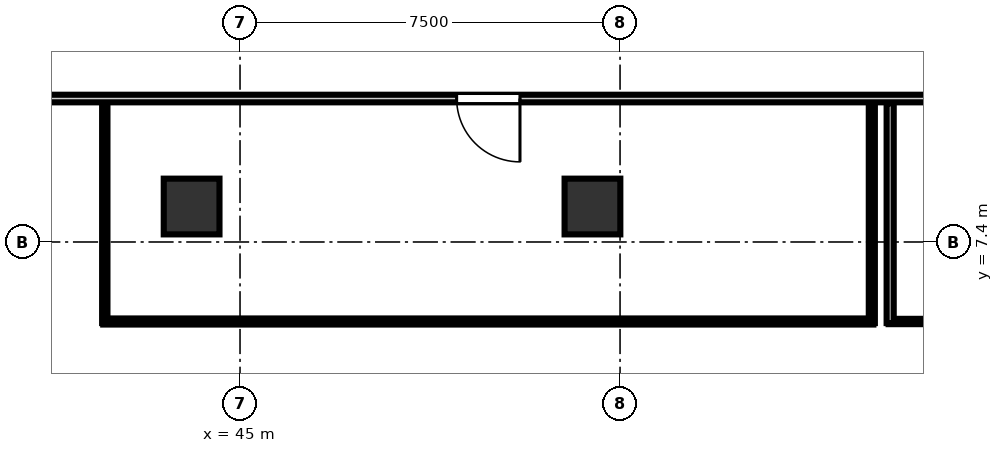
"""IFC4 building model, lengths in metres.
Left out: names, types, materials, properties, quantities, classifications, styles, units other than length and angle.
Written with IfcOpenShell. Run it as: python <this file> out.ifc"""

import sys

from ifc_helpers import new_model, si_unit, direction, frame, frame_2d, origin, origin_2d, place, context, subcontext, project, spatial, rectangle, extrude, element, fill, save


model = new_model("IFC4")
c1 = context("Model", 3, precision=1e-05, world=origin(), true_north=direction((0.0, 1.0)))
c2 = subcontext(c1, "Body", "Model", "MODEL_VIEW")
j1 = project(units=[si_unit("LENGTHUNIT", "METRE"), si_unit("PLANEANGLEUNIT", "RADIAN")], contexts=[c1])
p1 = place(None, origin())
s1 = spatial("IfcSite", under=j1, at=p1, CompositionType="ELEMENT")
p2 = place(p1, origin())
s2 = spatial("IfcBuilding", under=s1, at=p2, CompositionType="ELEMENT")
p3 = place(p2, frame((0.0, 0.0, 6.0)))
s3 = spatial("IfcBuildingStorey", under=s2, at=p3, CompositionType="ELEMENT", Elevation=6.0)
for number, where, z_axis, x_axis in (
    (1, (44.045, 8.1, 0.0), (0.0, 0.0, 1.0), (1.0, 0.0, 0.0)),
    (2, (51.955, 8.1, 0.0), (0.0, 0.0, 1.0), (1.0, 0.0, 0.0)),
):
    element("IfcColumn", number, at=place(p3, frame(where, z_axis=z_axis, x_axis=x_axis)), inside=s3, PredefinedType="COLUMN", context=c2, shape_type="SweptSolid", body=[
        extrude(rectangle(XDim=1.1, YDim=1.1, at=origin_2d()), origin(), (0.0, 0.0, 1.0), 5.0),
    ])
p4 = place(p3, frame((67.2, 10.231, 0.0), z_axis=(0.0, 0.0, 1.0), x_axis=(-1.0, 0.0, 0.0)))
e3 = element("IfcWall", 3, at=p4, inside=s3, PredefinedType="PARTITIONING", context=c2, shape_type="SweptSolid", body=[
    extrude(rectangle(XDim=60.4, YDim=0.15, at=frame_2d((30.2, 0.0))), origin(), (0.0, 0.0, 1.0), 4.1),
])
p5 = place(p4, frame((47.503, 0.0, 0.0)))
e4 = element("IfcOpeningElement", 4, at=p5, cuts=e3, PredefinedType="OPENING", context=c2, shape_type="SweptSolid", body=[
    extrude(rectangle(XDim=1.25, YDim=2.2, at=frame_2d((0.625, 1.1))), frame((0.0, 0.085, 0.0), z_axis=(0.0, -1.0, 0.0), x_axis=(1.0, 0.0, 0.0)), (0.0, 0.0, 1.0), 0.17),
])
p6 = place(p4, frame((16.675, 0.0, 0.0)))
e5 = element("IfcOpeningElement", 5, at=p6, cuts=e3, PredefinedType="OPENING", context=c2, shape_type="SweptSolid", body=[
    extrude(rectangle(XDim=1.25, YDim=2.2, at=frame_2d((0.625, 1.1))), frame((0.0, 0.085, 0.0), z_axis=(0.0, -1.0, 0.0), x_axis=(1.0, 0.0, 0.0)), (0.0, 0.0, 1.0), 0.17),
])
p7 = place(p4, frame((4.447, 0.0, 0.0)))
e6 = element("IfcOpeningElement", 6, at=p7, cuts=e3, PredefinedType="OPENING", context=c2, shape_type="SweptSolid", body=[
    extrude(rectangle(XDim=1.25, YDim=2.2, at=frame_2d((0.625, 1.1))), frame((0.0, 0.085, 0.0), z_axis=(0.0, -1.0, 0.0), x_axis=(1.0, 0.0, 0.0)), (0.0, 0.0, 1.0), 0.17),
])
p8 = place(p3, frame((57.5, 5.831, 0.0), z_axis=(0.0, 0.0, 1.0), x_axis=(-1.0, 0.0, 0.0)))
e7 = element("IfcWall", 7, at=p8, inside=s3, PredefinedType="PARTITIONING", context=c2, shape_type="SweptSolid", body=[
    extrude(rectangle(XDim=15.2, YDim=0.12, at=frame_2d((7.6, 0.0))), origin(), (0.0, 0.0, 1.0), 4.1),
])
p9 = place(p3, frame((42.331, 5.8, 0.0), z_axis=(0.0, 0.0, 1.0), x_axis=(0.0, 1.0, 0.0)))
e8 = element("IfcWall", 8, at=p9, inside=s3, PredefinedType="PARTITIONING", context=c2, shape_type="SweptSolid", body=[
    extrude(rectangle(XDim=4.338, YDim=0.105, at=frame_2d((2.169, 0.0))), origin(), (0.0, 0.0, 1.0), 4.1),
])
p10 = place(p3, frame((57.469, 10.138, 0.0), z_axis=(0.0, 0.0, 1.0), x_axis=(0.0, -1.0, 0.0)))
e9 = element("IfcWall", 9, at=p10, inside=s3, PredefinedType="PARTITIONING", context=c2, shape_type="SweptSolid", body=[
    extrude(rectangle(XDim=4.338, YDim=0.12, at=frame_2d((2.169, 0.0))), origin(), (0.0, 0.0, 1.0), 4.1),
])
p11 = place(p3, frame((69.2, 5.831, 0.0), z_axis=(0.0, 0.0, 1.0), x_axis=(-1.0, 0.0, 0.0)))
e10 = element("IfcWall", 10, at=p11, inside=s3, PredefinedType="PARTITIONING", context=c2, shape_type="SweptSolid", body=[
    extrude(rectangle(XDim=11.4, YDim=0.105, at=frame_2d((5.7, 0.0))), origin(), (0.0, 0.0, 1.0), 4.1),
])
p12 = place(p3, frame((57.831, 5.8, 0.0), z_axis=(0.0, 0.0, 1.0), x_axis=(0.0, 1.0, 0.0)))
e11 = element("IfcWall", 11, at=p12, inside=s3, PredefinedType="PARTITIONING", context=c2, shape_type="SweptSolid", body=[
    extrude(rectangle(XDim=4.338, YDim=0.14, at=frame_2d((2.169, 0.0))), origin(), (0.0, 0.0, 1.0), 4.1),
])
p13 = place(p6, origin())
e12 = element("IfcDoor", 12, at=p13, inside=s3, OperationType="SINGLE_SWING_LEFT", PredefinedType="DOOR", context=c2, shape_type="SweptSolid", body=[
    extrude(rectangle(XDim=1.25, YDim=2.2, at=frame_2d((0.625, 1.1))), frame((0.0, 0.025, 0.0), z_axis=(0.0, -1.0, 0.0), x_axis=(1.0, 0.0, 0.0)), (0.0, 0.0, 1.0), 0.05),
])
fill(e5, e12)
save(model, sys.argv[1])
